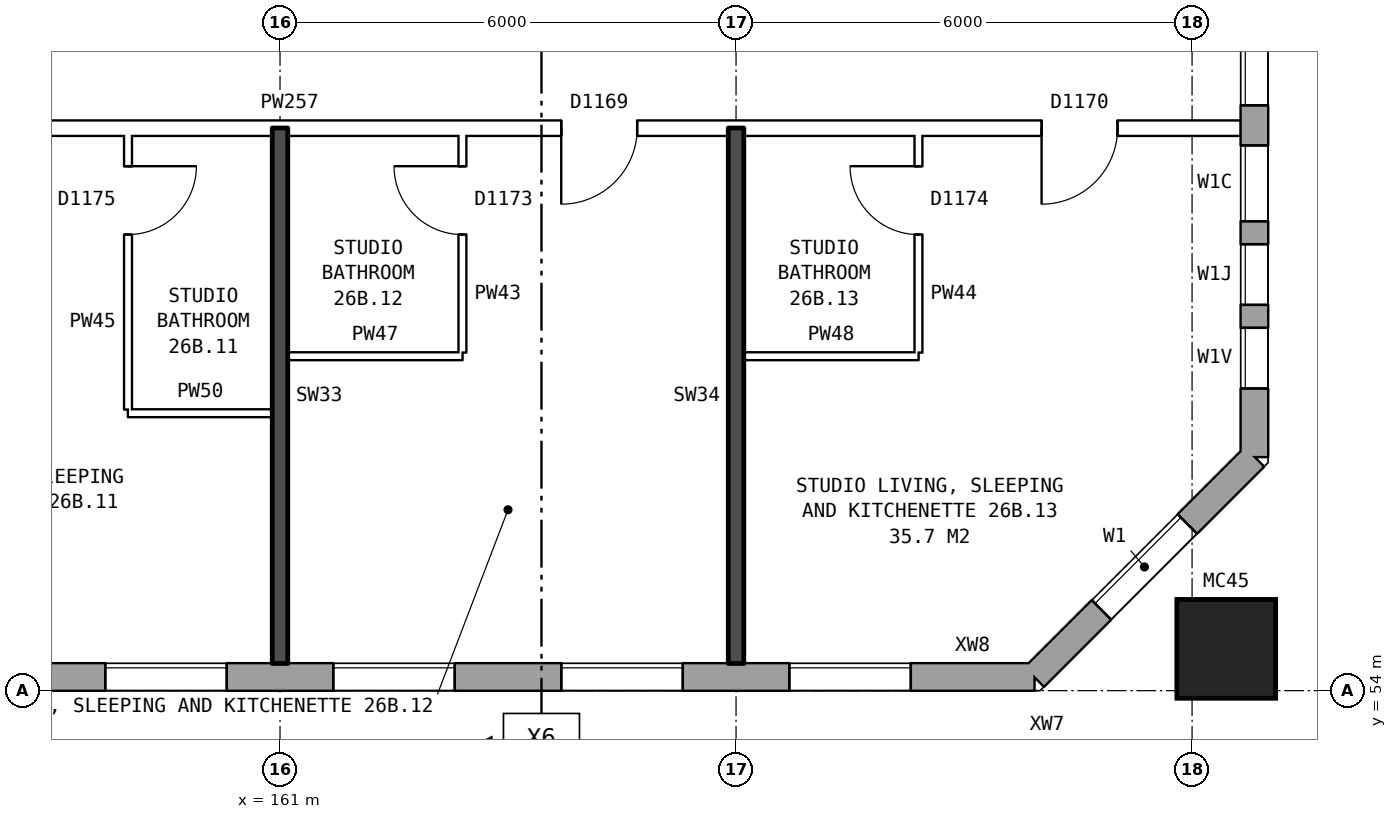
"""IFC4 building model, lengths in metres.
Left out: names, types, materials, properties, quantities, classifications, styles, units other than length and angle.
Written with IfcOpenShell. Run it as: python <this file> out.ifc"""

import sys

from ifc_helpers import new_model, si_unit, direction, frame, frame_2d, origin, origin_2d, place, context, subcontext, project, spatial, rectangle, hollow_rectangle, extrude, element, fill, save


model = new_model("IFC4")
c1 = context("Model", 3, precision=1e-05, world=origin(), true_north=direction((0.0, 1.0)))
c2 = subcontext(c1, "Body", "Model", "MODEL_VIEW")
j1 = project(units=[si_unit("LENGTHUNIT", "METRE"), si_unit("PLANEANGLEUNIT", "RADIAN")], contexts=[c1])
p1 = place(None, origin())
s1 = spatial("IfcSite", under=j1, at=p1, CompositionType="ELEMENT")
p2 = place(p1, origin())
s2 = spatial("IfcBuilding", under=s1, at=p2, CompositionType="ELEMENT")
p3 = place(p2, frame((0.0, 0.0, 96.4)))
s3 = spatial("IfcBuildingStorey", under=s2, at=p3, CompositionType="ELEMENT", Elevation=96.4)
p4 = place(p3, frame((173.45, 54.55, 0.0), z_axis=(0.0, 0.0, 1.0), x_axis=(1.0, 0.0, 0.0)))
e1 = element("IfcColumn", 1, at=p4, inside=s3, PredefinedType="COLUMN", context=c2, shape_type="SweptSolid", body=[
    extrude(hollow_rectangle(XDim=1.3, YDim=1.3, WallThickness=0.07, at=origin_2d()), origin(), (0.0, 0.0, 1.0), 3.1),
])
p5 = place(p3, frame((134.075, 54.18, 0.0), z_axis=(0.0, 0.0, 1.0), x_axis=(1.0, 0.0, 0.0)))
e2 = element("IfcWall", 2, at=p5, inside=s3, PredefinedType="STANDARD", context=c2, shape_type="SweptSolid", body=[
    extrude(rectangle(XDim=36.851, YDim=0.36, at=frame_2d((18.425, 0.0))), origin(), (0.0, 0.0, 1.0), 2.85),
])
p6 = place(p5, frame((0.35, 0.0, 0.8)))
e3 = element("IfcOpeningElement", 3, at=p6, cuts=e2, PredefinedType="OPENING", context=c2, shape_type="SweptSolid", body=[
    extrude(rectangle(XDim=0.6, YDim=1.2, at=frame_2d((0.3, 0.6))), frame((0.0, 0.19, 0.0), z_axis=(0.0, -1.0, 0.0), x_axis=(1.0, 0.0, 0.0)), (0.0, 0.0, 1.0), 0.38),
])
p7 = place(p5, frame((3.625, 0.0, 0.8)))
e4 = element("IfcOpeningElement", 4, at=p7, cuts=e2, PredefinedType="OPENING", context=c2, shape_type="SweptSolid", body=[
    extrude(rectangle(XDim=1.6, YDim=1.8, at=frame_2d((0.8, 0.9))), frame((0.0, 0.19, 0.0), z_axis=(0.0, -1.0, 0.0), x_axis=(1.0, 0.0, 0.0)), (0.0, 0.0, 1.0), 0.38),
])
p8 = place(p5, frame((6.625, 0.0, 0.8)))
e5 = element("IfcOpeningElement", 5, at=p8, cuts=e2, PredefinedType="OPENING", context=c2, shape_type="SweptSolid", body=[
    extrude(rectangle(XDim=1.6, YDim=1.8, at=frame_2d((0.8, 0.9))), frame((0.0, 0.19, 0.0), z_axis=(0.0, -1.0, 0.0), x_axis=(1.0, 0.0, 0.0)), (0.0, 0.0, 1.0), 0.38),
])
p9 = place(p5, frame((9.625, 0.0, 0.8)))
e6 = element("IfcOpeningElement", 6, at=p9, cuts=e2, PredefinedType="OPENING", context=c2, shape_type="SweptSolid", body=[
    extrude(rectangle(XDim=1.6, YDim=1.8, at=frame_2d((0.8, 0.9))), frame((0.0, 0.19, 0.0), z_axis=(0.0, -1.0, 0.0), x_axis=(1.0, 0.0, 0.0)), (0.0, 0.0, 1.0), 0.38),
])
p10 = place(p5, frame((12.625, 0.0, 0.8)))
e7 = element("IfcOpeningElement", 7, at=p10, cuts=e2, PredefinedType="OPENING", context=c2, shape_type="SweptSolid", body=[
    extrude(rectangle(XDim=1.6, YDim=1.8, at=frame_2d((0.8, 0.9))), frame((0.0, 0.19, 0.0), z_axis=(0.0, -1.0, 0.0), x_axis=(1.0, 0.0, 0.0)), (0.0, 0.0, 1.0), 0.38),
])
p11 = place(p5, frame((15.625, 0.0, 0.8)))
e8 = element("IfcOpeningElement", 8, at=p11, cuts=e2, PredefinedType="OPENING", context=c2, shape_type="SweptSolid", body=[
    extrude(rectangle(XDim=1.6, YDim=1.8, at=frame_2d((0.8, 0.9))), frame((0.0, 0.19, 0.0), z_axis=(0.0, -1.0, 0.0), x_axis=(1.0, 0.0, 0.0)), (0.0, 0.0, 1.0), 0.38),
])
p12 = place(p5, frame((18.625, 0.0, 0.8)))
e9 = element("IfcOpeningElement", 9, at=p12, cuts=e2, PredefinedType="OPENING", context=c2, shape_type="SweptSolid", body=[
    extrude(rectangle(XDim=1.6, YDim=1.8, at=frame_2d((0.8, 0.9))), frame((0.0, 0.19, 0.0), z_axis=(0.0, -1.0, 0.0), x_axis=(1.0, 0.0, 0.0)), (0.0, 0.0, 1.0), 0.38),
])
p13 = place(p5, frame((21.625, 0.0, 0.8)))
e10 = element("IfcOpeningElement", 10, at=p13, cuts=e2, PredefinedType="OPENING", context=c2, shape_type="SweptSolid", body=[
    extrude(rectangle(XDim=1.6, YDim=1.8, at=frame_2d((0.8, 0.9))), frame((0.0, 0.19, 0.0), z_axis=(0.0, -1.0, 0.0), x_axis=(1.0, 0.0, 0.0)), (0.0, 0.0, 1.0), 0.38),
])
p14 = place(p5, frame((24.625, 0.0, 0.8)))
e11 = element("IfcOpeningElement", 11, at=p14, cuts=e2, PredefinedType="OPENING", context=c2, shape_type="SweptSolid", body=[
    extrude(rectangle(XDim=1.6, YDim=1.8, at=frame_2d((0.8, 0.9))), frame((0.0, 0.19, 0.0), z_axis=(0.0, -1.0, 0.0), x_axis=(1.0, 0.0, 0.0)), (0.0, 0.0, 1.0), 0.38),
])
p15 = place(p5, frame((27.625, 0.0, 0.8)))
e12 = element("IfcOpeningElement", 12, at=p15, cuts=e2, PredefinedType="OPENING", context=c2, shape_type="SweptSolid", body=[
    extrude(rectangle(XDim=1.6, YDim=1.8, at=frame_2d((0.8, 0.9))), frame((0.0, 0.19, 0.0), z_axis=(0.0, -1.0, 0.0), x_axis=(1.0, 0.0, 0.0)), (0.0, 0.0, 1.0), 0.38),
])
p16 = place(p5, frame((30.625, 0.0, 0.8)))
e13 = element("IfcOpeningElement", 13, at=p16, cuts=e2, PredefinedType="OPENING", context=c2, shape_type="SweptSolid", body=[
    extrude(rectangle(XDim=1.6, YDim=1.8, at=frame_2d((0.8, 0.9))), frame((0.0, 0.19, 0.0), z_axis=(0.0, -1.0, 0.0), x_axis=(1.0, 0.0, 0.0)), (0.0, 0.0, 1.0), 0.38),
])
p17 = place(p5, frame((33.625, 0.0, 0.8)))
e14 = element("IfcOpeningElement", 14, at=p17, cuts=e2, PredefinedType="OPENING", context=c2, shape_type="SweptSolid", body=[
    extrude(rectangle(XDim=1.6, YDim=1.8, at=frame_2d((0.8, 0.9))), frame((0.0, 0.19, 0.0), z_axis=(0.0, -1.0, 0.0), x_axis=(1.0, 0.0, 0.0)), (0.0, 0.0, 1.0), 0.38),
])
p18 = place(p5, frame((1.25, 0.0, 0.8)))
e15 = element("IfcOpeningElement", 15, at=p18, cuts=e2, PredefinedType="OPENING", context=c2, shape_type="SweptSolid", body=[
    extrude(rectangle(XDim=1.4, YDim=1.8, at=frame_2d((0.7, 0.9))), frame((0.0, 0.19, 0.0), z_axis=(0.0, -1.0, 0.0), x_axis=(1.0, 0.0, 0.0)), (0.0, 0.0, 1.0), 0.38),
])
p19 = place(p3, frame((170.925, 54.18, 0.0), z_axis=(0.0, 0.0, 1.0), x_axis=(0.707106781187, 0.707106781187, 0.0)))
e16 = element("IfcWall", 16, at=p19, inside=s3, PredefinedType="STANDARD", context=c2, shape_type="SweptSolid", body=[
    extrude(rectangle(XDim=4.094, YDim=0.36, at=frame_2d((2.047, 0.0))), origin(), (0.0, 0.0, 1.0), 2.85),
])
p20 = place(p19, frame((1.247, 0.0, 0.8)))
e17 = element("IfcOpeningElement", 17, at=p20, cuts=e16, PredefinedType="OPENING", context=c2, shape_type="SweptSolid", body=[
    extrude(rectangle(XDim=1.6, YDim=1.8, at=frame_2d((0.8, 0.9))), frame((0.0, 0.19, 0.0), z_axis=(0.0, -1.0, 0.0), x_axis=(1.0, 0.0, 0.0)), (0.0, 0.0, 1.0), 0.38),
])
p21 = place(p3, frame((173.82, 57.075, 0.0), z_axis=(0.0, 0.0, 1.0), x_axis=(0.0, 1.0, 0.0)))
e18 = element("IfcWall", 18, at=p21, inside=s3, PredefinedType="STANDARD", context=c2, shape_type="SweptSolid", body=[
    extrude(rectangle(XDim=25.851, YDim=0.36, at=frame_2d((12.925, 0.0))), origin(), (0.0, 0.0, 1.0), 2.85),
])
p22 = place(p21, frame((0.9, 0.0, 0.8)))
e19 = element("IfcOpeningElement", 19, at=p22, cuts=e18, PredefinedType="OPENING", context=c2, shape_type="SweptSolid", body=[
    extrude(rectangle(XDim=0.8, YDim=0.9, at=frame_2d((0.4, 0.45))), frame((0.0, 0.19, 0.0), z_axis=(0.0, -1.0, 0.0), x_axis=(1.0, 0.0, 0.0)), (0.0, 0.0, 1.0), 0.38),
])
p23 = place(p21, frame((4.625, 0.0, 0.8)))
e20 = element("IfcOpeningElement", 20, at=p23, cuts=e18, PredefinedType="OPENING", context=c2, shape_type="SweptSolid", body=[
    extrude(rectangle(XDim=1.6, YDim=1.8, at=frame_2d((0.8, 0.9))), frame((0.0, 0.19, 0.0), z_axis=(0.0, -1.0, 0.0), x_axis=(1.0, 0.0, 0.0)), (0.0, 0.0, 1.0), 0.38),
])
p24 = place(p21, frame((7.625, 0.0, 0.8)))
e21 = element("IfcOpeningElement", 21, at=p24, cuts=e18, PredefinedType="OPENING", context=c2, shape_type="SweptSolid", body=[
    extrude(rectangle(XDim=1.6, YDim=1.8, at=frame_2d((0.8, 0.9))), frame((0.0, 0.19, 0.0), z_axis=(0.0, -1.0, 0.0), x_axis=(1.0, 0.0, 0.0)), (0.0, 0.0, 1.0), 0.38),
])
p25 = place(p21, frame((10.625, 0.0, 0.8)))
e22 = element("IfcOpeningElement", 22, at=p25, cuts=e18, PredefinedType="OPENING", context=c2, shape_type="SweptSolid", body=[
    extrude(rectangle(XDim=1.6, YDim=1.8, at=frame_2d((0.8, 0.9))), frame((0.0, 0.19, 0.0), z_axis=(0.0, -1.0, 0.0), x_axis=(1.0, 0.0, 0.0)), (0.0, 0.0, 1.0), 0.38),
])
p26 = place(p21, frame((13.625, 0.0, 0.8)))
e23 = element("IfcOpeningElement", 23, at=p26, cuts=e18, PredefinedType="OPENING", context=c2, shape_type="SweptSolid", body=[
    extrude(rectangle(XDim=1.6, YDim=1.8, at=frame_2d((0.8, 0.9))), frame((0.0, 0.19, 0.0), z_axis=(0.0, -1.0, 0.0), x_axis=(1.0, 0.0, 0.0)), (0.0, 0.0, 1.0), 0.38),
])
p27 = place(p21, frame((16.625, 0.0, 0.8)))
e24 = element("IfcOpeningElement", 24, at=p27, cuts=e18, PredefinedType="OPENING", context=c2, shape_type="SweptSolid", body=[
    extrude(rectangle(XDim=1.6, YDim=1.8, at=frame_2d((0.8, 0.9))), frame((0.0, 0.19, 0.0), z_axis=(0.0, -1.0, 0.0), x_axis=(1.0, 0.0, 0.0)), (0.0, 0.0, 1.0), 0.38),
])
p28 = place(p21, frame((19.625, 0.0, 0.8)))
e25 = element("IfcOpeningElement", 25, at=p28, cuts=e18, PredefinedType="OPENING", context=c2, shape_type="SweptSolid", body=[
    extrude(rectangle(XDim=1.6, YDim=1.8, at=frame_2d((0.8, 0.9))), frame((0.0, 0.19, 0.0), z_axis=(0.0, -1.0, 0.0), x_axis=(1.0, 0.0, 0.0)), (0.0, 0.0, 1.0), 0.38),
])
p29 = place(p21, frame((21.725, 0.0, 0.8)))
e26 = element("IfcOpeningElement", 26, at=p29, cuts=e18, PredefinedType="OPENING", context=c2, shape_type="SweptSolid", body=[
    extrude(rectangle(XDim=1.4, YDim=1.8, at=frame_2d((0.7, 0.9))), frame((0.0, 0.19, 0.0), z_axis=(0.0, -1.0, 0.0), x_axis=(1.0, 0.0, 0.0)), (0.0, 0.0, 1.0), 0.38),
])
p30 = place(p21, frame((2.0, 0.0, 0.8)))
e27 = element("IfcOpeningElement", 27, at=p30, cuts=e18, PredefinedType="OPENING", context=c2, shape_type="SweptSolid", body=[
    extrude(rectangle(XDim=0.8, YDim=1.5, at=frame_2d((0.4, 0.75))), frame((0.0, 0.19, 0.0), z_axis=(0.0, -1.0, 0.0), x_axis=(1.0, 0.0, 0.0)), (0.0, 0.0, 1.0), 0.38),
])
p31 = place(p21, frame((3.1, 0.0, 0.8)))
e28 = element("IfcOpeningElement", 28, at=p31, cuts=e18, PredefinedType="OPENING", context=c2, shape_type="SweptSolid", body=[
    extrude(rectangle(XDim=1.0, YDim=1.8, at=frame_2d((0.5, 0.9))), frame((0.0, 0.19, 0.0), z_axis=(0.0, -1.0, 0.0), x_axis=(1.0, 0.0, 0.0)), (0.0, 0.0, 1.0), 0.38),
])
p32 = place(p21, frame((23.425, 0.0, 0.8)))
e29 = element("IfcOpeningElement", 29, at=p32, cuts=e18, PredefinedType="OPENING", context=c2, shape_type="SweptSolid", body=[
    extrude(rectangle(XDim=1.0, YDim=1.2, at=frame_2d((0.5, 0.6))), frame((0.0, 0.19, 0.0), z_axis=(0.0, -1.0, 0.0), x_axis=(1.0, 0.0, 0.0)), (0.0, 0.0, 1.0), 0.38),
])
p33 = place(p3, frame((159.0, 57.65, 0.0), z_axis=(0.0, 0.0, 1.0), x_axis=(1.0, 0.0, 0.0)))
e30 = element("IfcWall", 30, at=p33, inside=s3, PredefinedType="PARTITIONING", context=c2, shape_type="SweptSolid", body=[
    extrude(rectangle(XDim=1.9, YDim=0.1, at=frame_2d((0.95, 0.0))), origin(), (0.0, 0.0, 1.0), 2.85),
])
for number, where, z_axis, x_axis in (
    (31, (161.1, 58.4, 0.0), (0.0, 0.0, 1.0), (1.0, 0.0, 0.0)),
    (32, (167.1, 58.4, 0.0), (0.0, 0.0, 1.0), (1.0, 0.0, 0.0)),
):
    element("IfcWall", number, at=place(p3, frame(where, z_axis=z_axis, x_axis=x_axis)), inside=s3, PredefinedType="PARTITIONING", context=c2, shape_type="SweptSolid", body=[
        extrude(rectangle(XDim=2.3, YDim=0.1, at=frame_2d((1.15, 0.0))), origin(), (0.0, 0.0, 1.0), 2.85),
    ])
p34 = place(p3, frame((155.1, 61.4, 0.0), z_axis=(0.0, 0.0, 1.0), x_axis=(1.0, 0.0, 0.0)))
e33 = element("IfcWall", 33, at=p34, inside=s3, PredefinedType="PARTITIONING", context=c2, shape_type="SweptSolid", body=[
    extrude(rectangle(XDim=18.54, YDim=0.2, at=frame_2d((9.27, 0.0))), origin(), (0.0, 0.0, 1.0), 2.85),
])
p35 = place(p34, frame((1.45, 0.0, 0.0)))
e34 = element("IfcOpeningElement", 34, at=p35, cuts=e33, PredefinedType="OPENING", context=c2, shape_type="SweptSolid", body=[
    extrude(rectangle(XDim=1.0, YDim=2.1, at=frame_2d((0.5, 1.05))), frame((0.0, 0.11, 0.0), z_axis=(0.0, -1.0, 0.0), x_axis=(1.0, 0.0, 0.0)), (0.0, 0.0, 1.0), 0.22),
])
p36 = place(p34, frame((9.6, 0.0, 0.0)))
e35 = element("IfcOpeningElement", 35, at=p36, cuts=e33, PredefinedType="OPENING", context=c2, shape_type="SweptSolid", body=[
    extrude(rectangle(XDim=1.0, YDim=2.1, at=frame_2d((0.5, 1.05))), frame((0.0, 0.11, 0.0), z_axis=(0.0, -1.0, 0.0), x_axis=(1.0, 0.0, 0.0)), (0.0, 0.0, 1.0), 0.22),
])
p37 = place(p34, frame((15.92, 0.0, 0.0)))
e36 = element("IfcOpeningElement", 36, at=p37, cuts=e33, PredefinedType="OPENING", context=c2, shape_type="SweptSolid", body=[
    extrude(rectangle(XDim=1.0, YDim=2.1, at=frame_2d((0.5, 1.05))), frame((0.0, 0.11, 0.0), z_axis=(0.0, -1.0, 0.0), x_axis=(1.0, 0.0, 0.0)), (0.0, 0.0, 1.0), 0.22),
])
p38 = place(p3, frame((159.0, 57.7, 0.0), z_axis=(0.0, 0.0, 1.0), x_axis=(0.0, 1.0, 0.0)))
e37 = element("IfcWall", 37, at=p38, inside=s3, PredefinedType="PARTITIONING", context=c2, shape_type="SweptSolid", body=[
    extrude(rectangle(XDim=3.6, YDim=0.1, at=frame_2d((1.8, 0.0))), origin(), (0.0, 0.0, 1.0), 2.85),
])
p39 = place(p38, frame((2.3, 0.0, 0.0)))
e38 = element("IfcOpeningElement", 38, at=p39, cuts=e37, PredefinedType="OPENING", context=c2, shape_type="SweptSolid", body=[
    extrude(rectangle(XDim=0.9, YDim=2.1, at=frame_2d((0.45, 1.05))), frame((0.0, 0.06, 0.0), z_axis=(0.0, -1.0, 0.0), x_axis=(1.0, 0.0, 0.0)), (0.0, 0.0, 1.0), 0.12),
])
p40 = place(p3, frame((161.0, 54.36, 0.0), z_axis=(0.0, 0.0, 1.0), x_axis=(0.0, 1.0, 0.0)))
e39 = element("IfcWall", 39, at=p40, inside=s3, PredefinedType="SOLIDWALL", context=c2, shape_type="SweptSolid", body=[
    extrude(rectangle(XDim=7.04, YDim=0.2, at=frame_2d((3.52, 0.0))), origin(), (0.0, 0.0, 1.0), 2.85),
])
p41 = place(p3, frame((163.4, 58.45, 0.0), z_axis=(0.0, 0.0, 1.0), x_axis=(0.0, 1.0, 0.0)))
e40 = element("IfcWall", 40, at=p41, inside=s3, PredefinedType="PARTITIONING", context=c2, shape_type="SweptSolid", body=[
    extrude(rectangle(XDim=2.85, YDim=0.1, at=frame_2d((1.425, 0.0))), origin(), (0.0, 0.0, 1.0), 2.85),
])
p42 = place(p41, frame((1.55, 0.0, 0.0)))
e41 = element("IfcOpeningElement", 41, at=p42, cuts=e40, PredefinedType="OPENING", context=c2, shape_type="SweptSolid", body=[
    extrude(rectangle(XDim=0.9, YDim=2.1, at=frame_2d((0.45, 1.05))), frame((0.0, 0.06, 0.0), z_axis=(0.0, -1.0, 0.0), x_axis=(1.0, 0.0, 0.0)), (0.0, 0.0, 1.0), 0.12),
])
p43 = place(p3, frame((167.0, 54.36, 0.0), z_axis=(0.0, 0.0, 1.0), x_axis=(0.0, 1.0, 0.0)))
e42 = element("IfcWall", 42, at=p43, inside=s3, PredefinedType="SOLIDWALL", context=c2, shape_type="SweptSolid", body=[
    extrude(rectangle(XDim=7.04, YDim=0.2, at=frame_2d((3.52, 0.0))), origin(), (0.0, 0.0, 1.0), 2.85),
])
p44 = place(p3, frame((169.4, 58.45, 0.0), z_axis=(0.0, 0.0, 1.0), x_axis=(0.0, 1.0, 0.0)))
e43 = element("IfcWall", 43, at=p44, inside=s3, PredefinedType="PARTITIONING", context=c2, shape_type="SweptSolid", body=[
    extrude(rectangle(XDim=2.85, YDim=0.1, at=frame_2d((1.425, 0.0))), origin(), (0.0, 0.0, 1.0), 2.85),
])
p45 = place(p44, frame((1.55, 0.0, 0.0)))
e44 = element("IfcOpeningElement", 44, at=p45, cuts=e43, PredefinedType="OPENING", context=c2, shape_type="SweptSolid", body=[
    extrude(rectangle(XDim=0.9, YDim=2.1, at=frame_2d((0.45, 1.05))), frame((0.0, 0.06, 0.0), z_axis=(0.0, -1.0, 0.0), x_axis=(1.0, 0.0, 0.0)), (0.0, 0.0, 1.0), 0.12),
])
p46 = place(p14, origin())
e45 = element("IfcWindow", 45, at=p46, inside=s3, PartitioningType="SINGLE_PANEL", PredefinedType="WINDOW", context=c2, shape_type="SweptSolid", body=[
    extrude(rectangle(XDim=1.6, YDim=1.8, at=frame_2d((0.8, 0.9))), frame((0.0, 0.15, 0.0), z_axis=(0.0, -1.0, 0.0), x_axis=(1.0, 0.0, 0.0)), (0.0, 0.0, 1.0), 0.06),
])
fill(e11, e45)
p47 = place(p15, origin())
e46 = element("IfcWindow", 46, at=p47, inside=s3, PartitioningType="SINGLE_PANEL", PredefinedType="WINDOW", context=c2, shape_type="SweptSolid", body=[
    extrude(rectangle(XDim=1.6, YDim=1.8, at=frame_2d((0.8, 0.9))), frame((0.0, 0.15, 0.0), z_axis=(0.0, -1.0, 0.0), x_axis=(1.0, 0.0, 0.0)), (0.0, 0.0, 1.0), 0.06),
])
fill(e12, e46)
p48 = place(p16, origin())
e47 = element("IfcWindow", 47, at=p48, inside=s3, PartitioningType="SINGLE_PANEL", PredefinedType="WINDOW", context=c2, shape_type="SweptSolid", body=[
    extrude(rectangle(XDim=1.6, YDim=1.8, at=frame_2d((0.8, 0.9))), frame((0.0, 0.15, 0.0), z_axis=(0.0, -1.0, 0.0), x_axis=(1.0, 0.0, 0.0)), (0.0, 0.0, 1.0), 0.06),
])
fill(e13, e47)
p49 = place(p17, origin())
e48 = element("IfcWindow", 48, at=p49, inside=s3, PartitioningType="SINGLE_PANEL", PredefinedType="WINDOW", context=c2, shape_type="SweptSolid", body=[
    extrude(rectangle(XDim=1.6, YDim=1.8, at=frame_2d((0.8, 0.9))), frame((0.0, 0.15, 0.0), z_axis=(0.0, -1.0, 0.0), x_axis=(1.0, 0.0, 0.0)), (0.0, 0.0, 1.0), 0.06),
])
fill(e14, e48)
p50 = place(p20, origin())
e49 = element("IfcWindow", 49, at=p50, inside=s3, PartitioningType="SINGLE_PANEL", PredefinedType="WINDOW", context=c2, shape_type="SweptSolid", body=[
    extrude(rectangle(XDim=1.6, YDim=1.8, at=frame_2d((0.8, 0.9))), frame((0.0, 0.15, 0.0), z_axis=(0.0, -1.0, 0.0), x_axis=(1.0, 0.0, 0.0)), (0.0, 0.0, 1.0), 0.06),
])
fill(e17, e49)
p51 = place(p22, origin())
e50 = element("IfcWindow", 50, at=p51, inside=s3, PartitioningType="SINGLE_PANEL", PredefinedType="WINDOW", context=c2, shape_type="SweptSolid", body=[
    extrude(rectangle(XDim=0.8, YDim=0.9, at=frame_2d((0.4, 0.45))), frame((0.0, 0.15, 0.0), z_axis=(0.0, -1.0, 0.0), x_axis=(1.0, 0.0, 0.0)), (0.0, 0.0, 1.0), 0.06),
])
fill(e19, e50)
p52 = place(p23, origin())
e51 = element("IfcWindow", 51, at=p52, inside=s3, PartitioningType="SINGLE_PANEL", PredefinedType="WINDOW", context=c2, shape_type="SweptSolid", body=[
    extrude(rectangle(XDim=1.6, YDim=1.8, at=frame_2d((0.8, 0.9))), frame((0.0, 0.15, 0.0), z_axis=(0.0, -1.0, 0.0), x_axis=(1.0, 0.0, 0.0)), (0.0, 0.0, 1.0), 0.06),
])
fill(e20, e51)
p53 = place(p39, frame((0.9, 0.0, 0.0), z_axis=(0.0, 0.0, 1.0), x_axis=(-1.0, 0.0, 0.0)))
e52 = element("IfcDoor", 52, at=p53, inside=s3, OperationType="SINGLE_SWING_LEFT", PredefinedType="DOOR", context=c2, shape_type="SweptSolid", body=[
    extrude(rectangle(XDim=0.9, YDim=2.1, at=frame_2d((0.45, 1.05))), frame((0.0, 0.025, 0.0), z_axis=(0.0, -1.0, 0.0), x_axis=(1.0, 0.0, 0.0)), (0.0, 0.0, 1.0), 0.05),
])
fill(e38, e52)
p54 = place(p36, frame((1.0, 0.0, 0.0), z_axis=(0.0, 0.0, 1.0), x_axis=(-1.0, 0.0, 0.0)))
e53 = element("IfcDoor", 53, at=p54, inside=s3, OperationType="SINGLE_SWING_RIGHT", PredefinedType="DOOR", context=c2, shape_type="SweptSolid", body=[
    extrude(rectangle(XDim=1.0, YDim=2.1, at=frame_2d((0.5, 1.05))), frame((0.0, 0.025, 0.0), z_axis=(0.0, -1.0, 0.0), x_axis=(1.0, 0.0, 0.0)), (0.0, 0.0, 1.0), 0.05),
])
fill(e35, e53)
p55 = place(p42, origin())
e54 = element("IfcDoor", 54, at=p55, inside=s3, OperationType="SINGLE_SWING_RIGHT", PredefinedType="DOOR", context=c2, shape_type="SweptSolid", body=[
    extrude(rectangle(XDim=0.9, YDim=2.1, at=frame_2d((0.45, 1.05))), frame((0.0, 0.025, 0.0), z_axis=(0.0, -1.0, 0.0), x_axis=(1.0, 0.0, 0.0)), (0.0, 0.0, 1.0), 0.05),
])
fill(e41, e54)
p56 = place(p37, frame((1.0, 0.0, 0.0), z_axis=(0.0, 0.0, 1.0), x_axis=(-1.0, 0.0, 0.0)))
e55 = element("IfcDoor", 55, at=p56, inside=s3, OperationType="SINGLE_SWING_RIGHT", PredefinedType="DOOR", context=c2, shape_type="SweptSolid", body=[
    extrude(rectangle(XDim=1.0, YDim=2.1, at=frame_2d((0.5, 1.05))), frame((0.0, 0.025, 0.0), z_axis=(0.0, -1.0, 0.0), x_axis=(1.0, 0.0, 0.0)), (0.0, 0.0, 1.0), 0.05),
])
fill(e36, e55)
p57 = place(p45, origin())
e56 = element("IfcDoor", 56, at=p57, inside=s3, OperationType="SINGLE_SWING_RIGHT", PredefinedType="DOOR", context=c2, shape_type="SweptSolid", body=[
    extrude(rectangle(XDim=0.9, YDim=2.1, at=frame_2d((0.45, 1.05))), frame((0.0, 0.025, 0.0), z_axis=(0.0, -1.0, 0.0), x_axis=(1.0, 0.0, 0.0)), (0.0, 0.0, 1.0), 0.05),
])
fill(e44, e56)
p58 = place(p30, origin())
e57 = element("IfcWindow", 57, at=p58, inside=s3, PartitioningType="SINGLE_PANEL", PredefinedType="WINDOW", context=c2, shape_type="SweptSolid", body=[
    extrude(rectangle(XDim=0.8, YDim=1.5, at=frame_2d((0.4, 0.75))), frame((0.0, 0.15, 0.0), z_axis=(0.0, -1.0, 0.0), x_axis=(1.0, 0.0, 0.0)), (0.0, 0.0, 1.0), 0.06),
])
fill(e27, e57)
p59 = place(p31, origin())
e58 = element("IfcWindow", 58, at=p59, inside=s3, PartitioningType="SINGLE_PANEL", PredefinedType="WINDOW", context=c2, shape_type="SweptSolid", body=[
    extrude(rectangle(XDim=1.0, YDim=1.8, at=frame_2d((0.5, 0.9))), frame((0.0, 0.15, 0.0), z_axis=(0.0, -1.0, 0.0), x_axis=(1.0, 0.0, 0.0)), (0.0, 0.0, 1.0), 0.06),
])
fill(e28, e58)
save(model, sys.argv[1])
